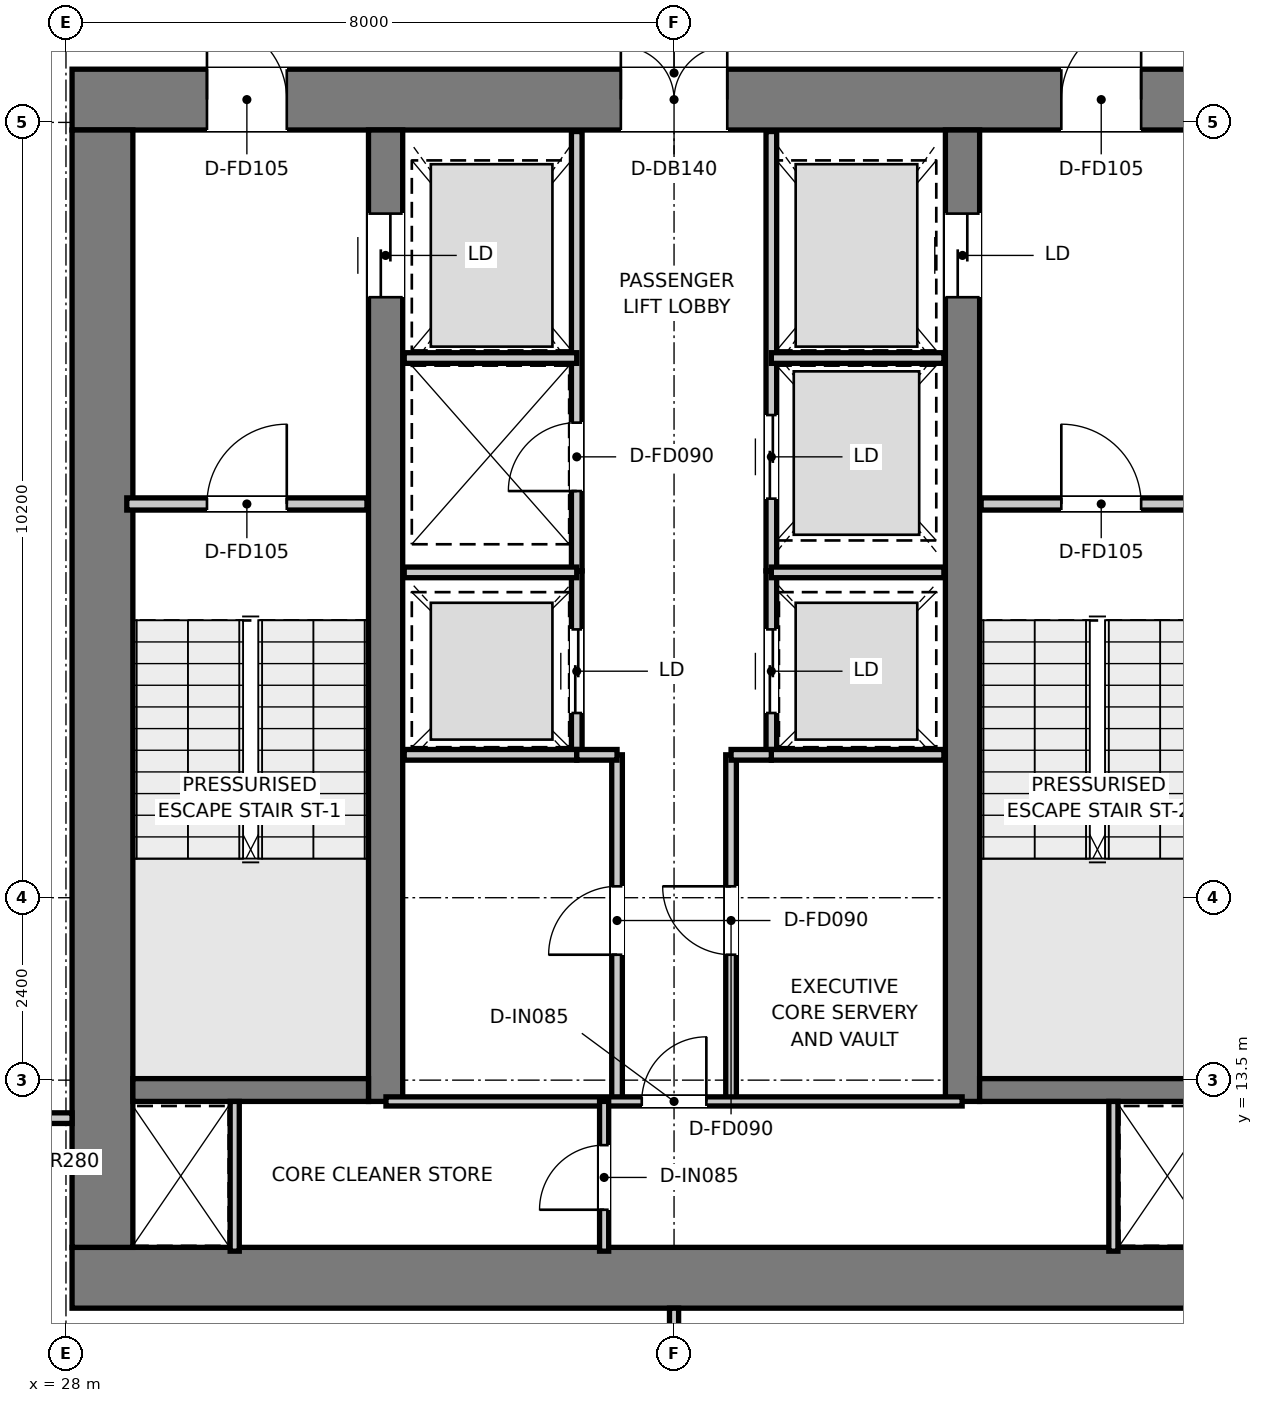
"""IFC4 building model, lengths in metres.
Left out: names, types, materials, properties, quantities, classifications, styles, units other than length and angle.
Written with IfcOpenShell. Run it as: python <this file> out.ifc"""

import sys

from ifc_helpers import new_model, si_unit, direction, frame, frame_2d, origin, place, context, subcontext, project, spatial, rectangle, extrude, element, fill, save


model = new_model("IFC4")
c1 = context("Model", 3, precision=1e-05, world=origin(), true_north=direction((0.0, 1.0)))
c2 = subcontext(c1, "Body", "Model", "MODEL_VIEW")
j1 = project(units=[si_unit("LENGTHUNIT", "METRE"), si_unit("PLANEANGLEUNIT", "RADIAN")], contexts=[c1])
p1 = place(None, origin())
s1 = spatial("IfcSite", under=j1, at=p1, CompositionType="ELEMENT")
p2 = place(p1, origin())
s2 = spatial("IfcBuilding", under=s1, at=p2, CompositionType="ELEMENT")
p3 = place(p2, frame((0.0, 0.0, 355.35)))
s3 = spatial("IfcBuildingStorey", under=s2, at=p3, CompositionType="ELEMENT", Elevation=355.35)
p4 = place(p3, frame((28.08, 10.9, 0.0), z_axis=(0.0, 0.0, 1.0), x_axis=(1.0, 0.0, 0.0)))
e1 = element("IfcWall", 1, at=p4, inside=s3, PredefinedType="SHEAR", context=c2, shape_type="SweptSolid", body=[
    extrude(rectangle(XDim=15.84, YDim=0.8, at=frame_2d((7.92, 0.0))), origin(), (0.0, 0.0, 1.0), 3.95),
])
p5 = place(p3, frame((28.08, 26.4, 0.0), z_axis=(0.0, 0.0, 1.0), x_axis=(1.0, 0.0, 0.0)))
e2 = element("IfcWall", 2, at=p5, inside=s3, PredefinedType="SHEAR", context=c2, shape_type="SweptSolid", body=[
    extrude(rectangle(XDim=15.84, YDim=0.8, at=frame_2d((7.92, 0.0))), origin(), (0.0, 0.0, 1.0), 3.95),
])
p6 = place(p5, frame((7.22, 0.0, 0.0)))
e3 = element("IfcOpeningElement", 3, at=p6, cuts=e2, PredefinedType="OPENING", context=c2, shape_type="SweptSolid", body=[
    extrude(rectangle(XDim=1.4, YDim=2.2, at=frame_2d((0.7, 1.1))), frame((0.0, 0.41, 0.0), z_axis=(0.0, -1.0, 0.0), x_axis=(1.0, 0.0, 0.0)), (0.0, 0.0, 1.0), 0.82),
])
p7 = place(p5, frame((1.775, 0.0, 0.0)))
e4 = element("IfcOpeningElement", 4, at=p7, cuts=e2, PredefinedType="OPENING", context=c2, shape_type="SweptSolid", body=[
    extrude(rectangle(XDim=1.05, YDim=2.1, at=frame_2d((0.525, 1.05))), frame((0.0, 0.41, 0.0), z_axis=(0.0, -1.0, 0.0), x_axis=(1.0, 0.0, 0.0)), (0.0, 0.0, 1.0), 0.82),
])
p8 = place(p5, frame((13.015, 0.0, 0.0)))
e5 = element("IfcOpeningElement", 5, at=p8, cuts=e2, PredefinedType="OPENING", context=c2, shape_type="SweptSolid", body=[
    extrude(rectangle(XDim=1.05, YDim=2.1, at=frame_2d((0.525, 1.05))), frame((0.0, 0.41, 0.0), z_axis=(0.0, -1.0, 0.0), x_axis=(1.0, 0.0, 0.0)), (0.0, 0.0, 1.0), 0.82),
])
p9 = place(p3, frame((28.48, 11.3, 0.0), z_axis=(0.0, 0.0, 1.0), x_axis=(0.0, 1.0, 0.0)))
e6 = element("IfcWall", 6, at=p9, inside=s3, PredefinedType="SHEAR", context=c2, shape_type="SweptSolid", body=[
    extrude(rectangle(XDim=14.7, YDim=0.8, at=frame_2d((7.35, 0.0))), origin(), (0.0, 0.0, 1.0), 3.95),
])
p10 = place(p3, frame((32.205, 13.22, 0.0), z_axis=(0.0, 0.0, 1.0), x_axis=(0.0, 1.0, 0.0)))
e7 = element("IfcWall", 7, at=p10, inside=s3, PredefinedType="SHEAR", context=c2, shape_type="SweptSolid", body=[
    extrude(rectangle(XDim=12.78, YDim=0.45, at=frame_2d((6.39, 0.0))), origin(), (0.0, 0.0, 1.0), 3.95),
])
p11 = place(p10, frame((10.58, 0.0, 0.0)))
e8 = element("IfcOpeningElement", 8, at=p11, cuts=e7, PredefinedType="OPENING", context=c2, shape_type="SweptSolid", body=[
    extrude(rectangle(XDim=1.1, YDim=2.15, at=frame_2d((0.55, 1.075))), frame((0.0, 0.235, 0.0), z_axis=(0.0, -1.0, 0.0), x_axis=(1.0, 0.0, 0.0)), (0.0, 0.0, 1.0), 0.47),
])
p12 = place(p3, frame((39.795, 13.22, 0.0), z_axis=(0.0, 0.0, 1.0), x_axis=(0.0, 1.0, 0.0)))
e9 = element("IfcWall", 9, at=p12, inside=s3, PredefinedType="SHEAR", context=c2, shape_type="SweptSolid", body=[
    extrude(rectangle(XDim=12.78, YDim=0.45, at=frame_2d((6.39, 0.0))), origin(), (0.0, 0.0, 1.0), 3.95),
])
p13 = place(p12, frame((10.58, 0.0, 0.0)))
e10 = element("IfcOpeningElement", 10, at=p13, cuts=e9, PredefinedType="OPENING", context=c2, shape_type="SweptSolid", body=[
    extrude(rectangle(XDim=1.1, YDim=2.15, at=frame_2d((0.55, 1.075))), frame((0.0, 0.235, 0.0), z_axis=(0.0, -1.0, 0.0), x_axis=(1.0, 0.0, 0.0)), (0.0, 0.0, 1.0), 0.47),
])
for number, where, z_axis, x_axis in (
    (11, (28.88, 13.37, 0.0), (0.0, 0.0, 1.0), (1.0, 0.0, 0.0)),
    (12, (40.02, 13.37, 0.0), (0.0, 0.0, 1.0), (1.0, 0.0, 0.0)),
):
    element("IfcWall", number, at=place(p3, frame(where, z_axis=z_axis, x_axis=x_axis)), inside=s3, PredefinedType="SHEAR", context=c2, shape_type="SweptSolid", body=[
        extrude(rectangle(XDim=3.1, YDim=0.3, at=frame_2d((1.55, 0.0))), origin(), (0.0, 0.0, 1.0), 3.95),
    ])
p14 = place(p3, frame((28.8, 21.08, 0.0), z_axis=(0.0, 0.0, 1.0), x_axis=(1.0, 0.0, 0.0)))
e13 = element("IfcWall", 13, at=p14, inside=s3, PredefinedType="PARTITIONING", context=c2, shape_type="SweptSolid", body=[
    extrude(rectangle(XDim=3.16, YDim=0.16, at=frame_2d((1.58, 0.0))), origin(), (0.0, 0.0, 1.0), 3.67),
])
p15 = place(p14, frame((1.055, 0.0, 0.0)))
e14 = element("IfcOpeningElement", 14, at=p15, cuts=e13, PredefinedType="OPENING", context=c2, shape_type="SweptSolid", body=[
    extrude(rectangle(XDim=1.05, YDim=2.1, at=frame_2d((0.525, 1.05))), frame((0.0, 0.09, 0.0), z_axis=(0.0, -1.0, 0.0), x_axis=(1.0, 0.0, 0.0)), (0.0, 0.0, 1.0), 0.18),
])
p16 = place(p3, frame((40.04, 21.08, 0.0), z_axis=(0.0, 0.0, 1.0), x_axis=(1.0, 0.0, 0.0)))
e15 = element("IfcWall", 15, at=p16, inside=s3, PredefinedType="PARTITIONING", context=c2, shape_type="SweptSolid", body=[
    extrude(rectangle(XDim=3.16, YDim=0.16, at=frame_2d((1.58, 0.0))), origin(), (0.0, 0.0, 1.0), 3.67),
])
p17 = place(p16, frame((1.055, 0.0, 0.0)))
e16 = element("IfcOpeningElement", 16, at=p17, cuts=e15, PredefinedType="OPENING", context=c2, shape_type="SweptSolid", body=[
    extrude(rectangle(XDim=1.05, YDim=2.1, at=frame_2d((0.525, 1.05))), frame((0.0, 0.09, 0.0), z_axis=(0.0, -1.0, 0.0), x_axis=(1.0, 0.0, 0.0)), (0.0, 0.0, 1.0), 0.18),
])
p18 = place(p3, frame((34.72, 20.2, 0.0), z_axis=(0.0, 0.0, 1.0), x_axis=(0.0, 1.0, 0.0)))
e17 = element("IfcWall", 17, at=p18, inside=s3, PredefinedType="PARTITIONING", context=c2, shape_type="SweptSolid", body=[
    extrude(rectangle(XDim=5.78, YDim=0.14, at=frame_2d((2.89, 0.0))), origin(), (0.0, 0.0, 1.0), 2.82),
])
p19 = place(p18, frame((1.05, 0.0, 0.0)))
e18 = element("IfcOpeningElement", 18, at=p19, cuts=e17, PredefinedType="OPENING", context=c2, shape_type="SweptSolid", body=[
    extrude(rectangle(XDim=0.9, YDim=2.1, at=frame_2d((0.45, 1.05))), frame((0.0, 0.08, 0.0), z_axis=(0.0, -1.0, 0.0), x_axis=(1.0, 0.0, 0.0)), (0.0, 0.0, 1.0), 0.16),
])
p20 = place(p3, frame((37.28, 20.2, 0.0), z_axis=(0.0, 0.0, 1.0), x_axis=(0.0, 1.0, 0.0)))
e19 = element("IfcWall", 19, at=p20, inside=s3, PredefinedType="PARTITIONING", context=c2, shape_type="SweptSolid", body=[
    extrude(rectangle(XDim=5.78, YDim=0.14, at=frame_2d((2.89, 0.0))), origin(), (0.0, 0.0, 1.0), 2.82),
])
p21 = place(p20, frame((0.95, 0.0, 0.0)))
e20 = element("IfcOpeningElement", 20, at=p21, cuts=e19, PredefinedType="OPENING", context=c2, shape_type="SweptSolid", body=[
    extrude(rectangle(XDim=1.1, YDim=2.15, at=frame_2d((0.55, 1.075))), frame((0.0, 0.08, 0.0), z_axis=(0.0, -1.0, 0.0), x_axis=(1.0, 0.0, 0.0)), (0.0, 0.0, 1.0), 0.16),
])
for number, where, z_axis, x_axis in (
    (21, (32.45, 23.0, 0.0), (0.0, 0.0, 1.0), (1.0, 0.0, 0.0)),
    (22, (37.28, 23.0, 0.0), (0.0, 0.0, 1.0), (1.0, 0.0, 0.0)),
):
    element("IfcWall", number, at=place(p3, frame(where, z_axis=z_axis, x_axis=x_axis)), inside=s3, PredefinedType="PARTITIONING", context=c2, shape_type="SweptSolid", body=[
        extrude(rectangle(XDim=2.27, YDim=0.14, at=frame_2d((1.135, 0.0))), origin(), (0.0, 0.0, 1.0), 2.82),
    ])
p22 = place(p3, frame((34.72, 17.78, 0.0), z_axis=(0.0, 0.0, 1.0), x_axis=(0.0, 1.0, 0.0)))
e23 = element("IfcWall", 23, at=p22, inside=s3, PredefinedType="PARTITIONING", context=c2, shape_type="SweptSolid", body=[
    extrude(rectangle(XDim=2.42, YDim=0.14, at=frame_2d((1.21, 0.0))), origin(), (0.0, 0.0, 1.0), 3.67),
])
p23 = place(p22, frame((0.55, 0.0, 0.0)))
e24 = element("IfcOpeningElement", 24, at=p23, cuts=e23, PredefinedType="OPENING", context=c2, shape_type="SweptSolid", body=[
    extrude(rectangle(XDim=1.1, YDim=2.15, at=frame_2d((0.55, 1.075))), frame((0.0, 0.08, 0.0), z_axis=(0.0, -1.0, 0.0), x_axis=(1.0, 0.0, 0.0)), (0.0, 0.0, 1.0), 0.16),
])
p24 = place(p3, frame((37.28, 17.78, 0.0), z_axis=(0.0, 0.0, 1.0), x_axis=(0.0, 1.0, 0.0)))
e25 = element("IfcWall", 25, at=p24, inside=s3, PredefinedType="PARTITIONING", context=c2, shape_type="SweptSolid", body=[
    extrude(rectangle(XDim=2.42, YDim=0.14, at=frame_2d((1.21, 0.0))), origin(), (0.0, 0.0, 1.0), 3.67),
])
p25 = place(p24, frame((0.55, 0.0, 0.0)))
e26 = element("IfcOpeningElement", 26, at=p25, cuts=e25, PredefinedType="OPENING", context=c2, shape_type="SweptSolid", body=[
    extrude(rectangle(XDim=1.1, YDim=2.15, at=frame_2d((0.55, 1.075))), frame((0.0, 0.08, 0.0), z_axis=(0.0, -1.0, 0.0), x_axis=(1.0, 0.0, 0.0)), (0.0, 0.0, 1.0), 0.16),
])
for number, where, z_axis, x_axis in (
    (27, (32.45, 17.78, 0.0), (0.0, 0.0, 1.0), (1.0, 0.0, 0.0)),
    (28, (32.45, 20.18, 0.0), (0.0, 0.0, 1.0), (1.0, 0.0, 0.0)),
    (29, (37.28, 17.78, 0.0), (0.0, 0.0, 1.0), (1.0, 0.0, 0.0)),
    (30, (37.28, 20.18, 0.0), (0.0, 0.0, 1.0), (1.0, 0.0, 0.0)),
):
    element("IfcWall", number, at=place(p3, frame(where, z_axis=z_axis, x_axis=x_axis)), inside=s3, PredefinedType="PARTITIONING", context=c2, shape_type="SweptSolid", body=[
        extrude(rectangle(XDim=2.27, YDim=0.14, at=frame_2d((1.135, 0.0))), origin(), (0.0, 0.0, 1.0), 3.67),
    ])
p26 = place(p3, frame((35.25, 13.22, 0.0), z_axis=(0.0, 0.0, 1.0), x_axis=(0.0, 1.0, 0.0)))
e31 = element("IfcWall", 31, at=p26, inside=s3, PredefinedType="PARTITIONING", context=c2, shape_type="SweptSolid", body=[
    extrude(rectangle(XDim=4.56, YDim=0.14, at=frame_2d((2.28, 0.0))), origin(), (0.0, 0.0, 1.0), 3.67),
])
p27 = place(p26, frame((1.93, 0.0, 0.0)))
e32 = element("IfcOpeningElement", 32, at=p27, cuts=e31, PredefinedType="OPENING", context=c2, shape_type="SweptSolid", body=[
    extrude(rectangle(XDim=0.9, YDim=2.1, at=frame_2d((0.45, 1.05))), frame((0.0, 0.08, 0.0), z_axis=(0.0, -1.0, 0.0), x_axis=(1.0, 0.0, 0.0)), (0.0, 0.0, 1.0), 0.16),
])
p28 = place(p3, frame((34.72, 17.78, 0.0), z_axis=(0.0, 0.0, 1.0), x_axis=(1.0, 0.0, 0.0)))
e33 = element("IfcWall", 33, at=p28, inside=s3, PredefinedType="PARTITIONING", context=c2, shape_type="SweptSolid", body=[
    extrude(rectangle(XDim=0.53, YDim=0.14, at=frame_2d((0.265, 0.0))), origin(), (0.0, 0.0, 1.0), 3.67),
])
p29 = place(p3, frame((36.75, 13.22, 0.0), z_axis=(0.0, 0.0, 1.0), x_axis=(0.0, 1.0, 0.0)))
e34 = element("IfcWall", 34, at=p29, inside=s3, PredefinedType="PARTITIONING", context=c2, shape_type="SweptSolid", body=[
    extrude(rectangle(XDim=4.56, YDim=0.14, at=frame_2d((2.28, 0.0))), origin(), (0.0, 0.0, 1.0), 3.67),
])
p30 = place(p29, frame((1.93, 0.0, 0.0)))
e35 = element("IfcOpeningElement", 35, at=p30, cuts=e34, PredefinedType="OPENING", context=c2, shape_type="SweptSolid", body=[
    extrude(rectangle(XDim=0.9, YDim=2.1, at=frame_2d((0.45, 1.05))), frame((0.0, 0.08, 0.0), z_axis=(0.0, -1.0, 0.0), x_axis=(1.0, 0.0, 0.0)), (0.0, 0.0, 1.0), 0.16),
])
p31 = place(p3, frame((36.75, 17.78, 0.0), z_axis=(0.0, 0.0, 1.0), x_axis=(1.0, 0.0, 0.0)))
e36 = element("IfcWall", 36, at=p31, inside=s3, PredefinedType="PARTITIONING", context=c2, shape_type="SweptSolid", body=[
    extrude(rectangle(XDim=0.53, YDim=0.14, at=frame_2d((0.265, 0.0))), origin(), (0.0, 0.0, 1.0), 3.67),
])
for number, where, z_axis, x_axis in (
    (37, (30.22, 11.25, 0.0), (0.0, 0.0, 1.0), (0.0, 1.0, 0.0)),
    (38, (41.78, 11.25, 0.0), (0.0, 0.0, 1.0), (0.0, 1.0, 0.0)),
):
    element("IfcWall", number, at=place(p3, frame(where, z_axis=z_axis, x_axis=x_axis)), inside=s3, PredefinedType="PARTITIONING", context=c2, shape_type="SweptSolid", body=[
        extrude(rectangle(XDim=1.97, YDim=0.12, at=frame_2d((0.985, 0.0))), origin(), (0.0, 0.0, 1.0), 3.67),
    ])
p32 = place(p3, frame((32.21, 13.22, 0.0), z_axis=(0.0, 0.0, 1.0), x_axis=(1.0, 0.0, 0.0)))
e39 = element("IfcWall", 39, at=p32, inside=s3, PredefinedType="PARTITIONING", context=c2, shape_type="SweptSolid", body=[
    extrude(rectangle(XDim=7.58, YDim=0.12, at=frame_2d((3.79, 0.0))), origin(), (0.0, 0.0, 1.0), 3.67),
])
p33 = place(p32, frame((3.365, 0.0, 0.0)))
e40 = element("IfcOpeningElement", 40, at=p33, cuts=e39, PredefinedType="OPENING", context=c2, shape_type="SweptSolid", body=[
    extrude(rectangle(XDim=0.85, YDim=2.1, at=frame_2d((0.425, 1.05))), frame((0.0, 0.07, 0.0), z_axis=(0.0, -1.0, 0.0), x_axis=(1.0, 0.0, 0.0)), (0.0, 0.0, 1.0), 0.14),
])
p34 = place(p3, frame((35.08, 11.25, 0.0), z_axis=(0.0, 0.0, 1.0), x_axis=(0.0, 1.0, 0.0)))
e41 = element("IfcWall", 41, at=p34, inside=s3, PredefinedType="PARTITIONING", context=c2, shape_type="SweptSolid", body=[
    extrude(rectangle(XDim=1.97, YDim=0.12, at=frame_2d((0.985, 0.0))), origin(), (0.0, 0.0, 1.0), 3.67),
])
p35 = place(p34, frame((0.545, 0.0, 0.0)))
e42 = element("IfcOpeningElement", 42, at=p35, cuts=e41, PredefinedType="OPENING", context=c2, shape_type="SweptSolid", body=[
    extrude(rectangle(XDim=0.85, YDim=2.1, at=frame_2d((0.425, 1.05))), frame((0.0, 0.07, 0.0), z_axis=(0.0, -1.0, 0.0), x_axis=(1.0, 0.0, 0.0)), (0.0, 0.0, 1.0), 0.14),
])
p36 = place(p3, frame((19.842, 13.0, 0.0), z_axis=(0.0, 0.0, 1.0), x_axis=(1.0, 0.0, 0.0)))
e43 = element("IfcWall", 43, at=p36, inside=s3, PredefinedType="PARTITIONING", context=c2, shape_type="SweptSolid", body=[
    extrude(rectangle(XDim=8.238, YDim=0.14, at=frame_2d((4.119, 0.0))), origin(), (0.0, 0.0, 1.0), 3.18),
])
p37 = place(p36, frame((6.933, 0.0, 0.0)))
e44 = element("IfcOpeningElement", 44, at=p37, cuts=e43, PredefinedType="OPENING", context=c2, shape_type="SweptSolid", body=[
    extrude(rectangle(XDim=0.85, YDim=2.1, at=frame_2d((0.425, 1.05))), frame((0.0, 0.08, 0.0), z_axis=(0.0, -1.0, 0.0), x_axis=(1.0, 0.0, 0.0)), (0.0, 0.0, 1.0), 0.16),
])
p38 = place(p3, frame((36.0, 7.253, 0.0), z_axis=(0.0, 0.0, 1.0), x_axis=(0.0, 1.0, 0.0)))
e45 = element("IfcWall", 45, at=p38, inside=s3, PredefinedType="PARTITIONING", context=c2, shape_type="SweptSolid", body=[
    extrude(rectangle(XDim=3.247, YDim=0.12, at=frame_2d((1.624, 0.0))), origin(), (0.0, 0.0, 1.0), 3.67),
])
p39 = place(p15, origin())
e46 = element("IfcDoor", 46, at=p39, inside=s3, OperationType="SINGLE_SWING_RIGHT", PredefinedType="DOOR", context=c2, shape_type="SweptSolid", body=[
    extrude(rectangle(XDim=1.05, YDim=2.1, at=frame_2d((0.525, 1.05))), frame((0.0, 0.025, 0.0), z_axis=(0.0, -1.0, 0.0), x_axis=(1.0, 0.0, 0.0)), (0.0, 0.0, 1.0), 0.05),
])
fill(e14, e46)
p40 = place(p17, origin())
e47 = element("IfcDoor", 47, at=p40, inside=s3, OperationType="SINGLE_SWING_LEFT", PredefinedType="DOOR", context=c2, shape_type="SweptSolid", body=[
    extrude(rectangle(XDim=1.05, YDim=2.1, at=frame_2d((0.525, 1.05))), frame((0.0, 0.025, 0.0), z_axis=(0.0, -1.0, 0.0), x_axis=(1.0, 0.0, 0.0)), (0.0, 0.0, 1.0), 0.05),
])
fill(e16, e47)
p41 = place(p6, origin())
e48 = element("IfcDoor", 48, at=p41, inside=s3, OperationType="DOUBLE_DOOR_SINGLE_SWING", PredefinedType="DOOR", context=c2, shape_type="SweptSolid", body=[
    extrude(rectangle(XDim=1.4, YDim=2.2, at=frame_2d((0.7, 1.1))), frame((0.0, 0.025, 0.0), z_axis=(0.0, -1.0, 0.0), x_axis=(1.0, 0.0, 0.0)), (0.0, 0.0, 1.0), 0.05),
])
fill(e3, e48)
p42 = place(p7, origin())
e49 = element("IfcDoor", 49, at=p42, inside=s3, OperationType="SINGLE_SWING_LEFT", PredefinedType="DOOR", context=c2, shape_type="SweptSolid", body=[
    extrude(rectangle(XDim=1.05, YDim=2.1, at=frame_2d((0.525, 1.05))), frame((0.0, 0.025, 0.0), z_axis=(0.0, -1.0, 0.0), x_axis=(1.0, 0.0, 0.0)), (0.0, 0.0, 1.0), 0.05),
])
fill(e4, e49)
p43 = place(p8, origin())
e50 = element("IfcDoor", 50, at=p43, inside=s3, OperationType="SINGLE_SWING_RIGHT", PredefinedType="DOOR", context=c2, shape_type="SweptSolid", body=[
    extrude(rectangle(XDim=1.05, YDim=2.1, at=frame_2d((0.525, 1.05))), frame((0.0, 0.025, 0.0), z_axis=(0.0, -1.0, 0.0), x_axis=(1.0, 0.0, 0.0)), (0.0, 0.0, 1.0), 0.05),
])
fill(e5, e50)
p44 = place(p11, origin())
e51 = element("IfcDoor", 51, at=p44, inside=s3, OperationType="DOUBLE_DOOR_SLIDING", PredefinedType="DOOR", context=c2, shape_type="SweptSolid", body=[
    extrude(rectangle(XDim=1.1, YDim=2.15, at=frame_2d((0.55, 1.075))), frame((0.0, 0.025, 0.0), z_axis=(0.0, -1.0, 0.0), x_axis=(1.0, 0.0, 0.0)), (0.0, 0.0, 1.0), 0.05),
])
fill(e8, e51)
p45 = place(p13, origin())
e52 = element("IfcDoor", 52, at=p45, inside=s3, OperationType="DOUBLE_DOOR_SLIDING", PredefinedType="DOOR", context=c2, shape_type="SweptSolid", body=[
    extrude(rectangle(XDim=1.1, YDim=2.15, at=frame_2d((0.55, 1.075))), frame((0.0, 0.025, 0.0), z_axis=(0.0, -1.0, 0.0), x_axis=(1.0, 0.0, 0.0)), (0.0, 0.0, 1.0), 0.05),
])
fill(e10, e52)
p46 = place(p19, origin())
e53 = element("IfcDoor", 53, at=p46, inside=s3, OperationType="SINGLE_SWING_LEFT", PredefinedType="DOOR", context=c2, shape_type="SweptSolid", body=[
    extrude(rectangle(XDim=0.9, YDim=2.1, at=frame_2d((0.45, 1.05))), frame((0.0, 0.025, 0.0), z_axis=(0.0, -1.0, 0.0), x_axis=(1.0, 0.0, 0.0)), (0.0, 0.0, 1.0), 0.05),
])
fill(e18, e53)
p47 = place(p21, origin())
e54 = element("IfcDoor", 54, at=p47, inside=s3, OperationType="DOUBLE_DOOR_SLIDING", PredefinedType="DOOR", context=c2, shape_type="SweptSolid", body=[
    extrude(rectangle(XDim=1.1, YDim=2.15, at=frame_2d((0.55, 1.075))), frame((0.0, 0.025, 0.0), z_axis=(0.0, -1.0, 0.0), x_axis=(1.0, 0.0, 0.0)), (0.0, 0.0, 1.0), 0.05),
])
fill(e20, e54)
p48 = place(p23, origin())
e55 = element("IfcDoor", 55, at=p48, inside=s3, OperationType="DOUBLE_DOOR_SLIDING", PredefinedType="DOOR", context=c2, shape_type="SweptSolid", body=[
    extrude(rectangle(XDim=1.1, YDim=2.15, at=frame_2d((0.55, 1.075))), frame((0.0, 0.025, 0.0), z_axis=(0.0, -1.0, 0.0), x_axis=(1.0, 0.0, 0.0)), (0.0, 0.0, 1.0), 0.05),
])
fill(e24, e55)
p49 = place(p25, origin())
e56 = element("IfcDoor", 56, at=p49, inside=s3, OperationType="DOUBLE_DOOR_SLIDING", PredefinedType="DOOR", context=c2, shape_type="SweptSolid", body=[
    extrude(rectangle(XDim=1.1, YDim=2.15, at=frame_2d((0.55, 1.075))), frame((0.0, 0.025, 0.0), z_axis=(0.0, -1.0, 0.0), x_axis=(1.0, 0.0, 0.0)), (0.0, 0.0, 1.0), 0.05),
])
fill(e26, e56)
p50 = place(p27, origin())
e57 = element("IfcDoor", 57, at=p50, inside=s3, OperationType="SINGLE_SWING_LEFT", PredefinedType="DOOR", context=c2, shape_type="SweptSolid", body=[
    extrude(rectangle(XDim=0.9, YDim=2.1, at=frame_2d((0.45, 1.05))), frame((0.0, 0.025, 0.0), z_axis=(0.0, -1.0, 0.0), x_axis=(1.0, 0.0, 0.0)), (0.0, 0.0, 1.0), 0.05),
])
fill(e32, e57)
p51 = place(p30, origin())
e58 = element("IfcDoor", 58, at=p51, inside=s3, OperationType="SINGLE_SWING_RIGHT", PredefinedType="DOOR", context=c2, shape_type="SweptSolid", body=[
    extrude(rectangle(XDim=0.9, YDim=2.1, at=frame_2d((0.45, 1.05))), frame((0.0, 0.025, 0.0), z_axis=(0.0, -1.0, 0.0), x_axis=(1.0, 0.0, 0.0)), (0.0, 0.0, 1.0), 0.05),
])
fill(e35, e58)
p52 = place(p33, origin())
e59 = element("IfcDoor", 59, at=p52, inside=s3, OperationType="SINGLE_SWING_RIGHT", PredefinedType="DOOR", context=c2, shape_type="SweptSolid", body=[
    extrude(rectangle(XDim=0.85, YDim=2.1, at=frame_2d((0.425, 1.05))), frame((0.0, 0.025, 0.0), z_axis=(0.0, -1.0, 0.0), x_axis=(1.0, 0.0, 0.0)), (0.0, 0.0, 1.0), 0.05),
])
fill(e40, e59)
p53 = place(p35, origin())
e60 = element("IfcDoor", 60, at=p53, inside=s3, OperationType="SINGLE_SWING_LEFT", PredefinedType="DOOR", context=c2, shape_type="SweptSolid", body=[
    extrude(rectangle(XDim=0.85, YDim=2.1, at=frame_2d((0.425, 1.05))), frame((0.0, 0.025, 0.0), z_axis=(0.0, -1.0, 0.0), x_axis=(1.0, 0.0, 0.0)), (0.0, 0.0, 1.0), 0.05),
])
fill(e42, e60)
save(model, sys.argv[1])
